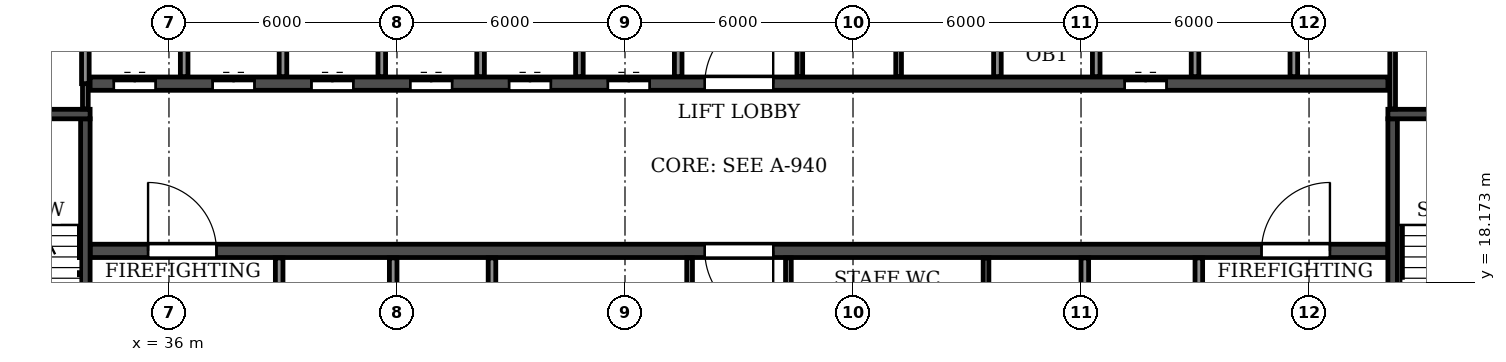
"""IFC4 building model, lengths in metres.
Left out: names, types, materials, properties, quantities, classifications, styles, units other than length and angle.
Written with IfcOpenShell. Run it as: python <this file> out.ifc"""

import sys

from ifc_helpers import new_model, si_unit, direction, frame, frame_2d, origin, place, context, subcontext, project, spatial, rectangle, extrude, element, fill, save


model = new_model("IFC4")
c1 = context("Model", 3, precision=1e-05, world=origin(), true_north=direction((0.0, 1.0)))
c2 = subcontext(c1, "Body", "Model", "MODEL_VIEW")
j1 = project(units=[si_unit("LENGTHUNIT", "METRE"), si_unit("PLANEANGLEUNIT", "RADIAN")], contexts=[c1])
p1 = place(None, origin())
s1 = spatial("IfcSite", under=j1, at=p1, CompositionType="ELEMENT")
p2 = place(p1, origin())
s2 = spatial("IfcBuilding", under=s1, at=p2, CompositionType="ELEMENT")
p3 = place(p2, frame((0.0, 0.0, 231.3)))
s3 = spatial("IfcBuildingStorey", under=s2, at=p3, CompositionType="ELEMENT", Elevation=231.3)
p4 = place(p3, frame((33.925, 19.0, 0.0), z_axis=(0.0, 0.0, 1.0), x_axis=(1.0, 0.0, 0.0)))
e1 = element("IfcWall", 1, at=p4, inside=s3, PredefinedType="SOLIDWALL", context=c2, shape_type="SweptSolid", body=[
    extrude(rectangle(XDim=34.15, YDim=0.35, at=frame_2d((17.075, 0.0))), origin(), (0.0, 0.0, 1.0), 3.08),
])
p5 = place(p4, frame((16.175, 0.0, 0.0)))
e2 = element("IfcOpeningElement", 2, at=p5, cuts=e1, PredefinedType="OPENING", context=c2, shape_type="SweptSolid", body=[
    extrude(rectangle(XDim=1.8, YDim=2.1, at=frame_2d((0.9, 1.05))), frame((0.0, 0.185, 0.0), z_axis=(0.0, -1.0, 0.0), x_axis=(1.0, 0.0, 0.0)), (0.0, 0.0, 1.0), 0.37),
])
p6 = place(p4, frame((1.525, 0.0, 0.0)))
e3 = element("IfcOpeningElement", 3, at=p6, cuts=e1, PredefinedType="OPENING", context=c2, shape_type="SweptSolid", body=[
    extrude(rectangle(XDim=1.8, YDim=2.1, at=frame_2d((0.9, 1.05))), frame((0.0, 0.185, 0.0), z_axis=(0.0, -1.0, 0.0), x_axis=(1.0, 0.0, 0.0)), (0.0, 0.0, 1.0), 0.37),
])
p7 = place(p4, frame((30.825, 0.0, 0.0)))
e4 = element("IfcOpeningElement", 4, at=p7, cuts=e1, PredefinedType="OPENING", context=c2, shape_type="SweptSolid", body=[
    extrude(rectangle(XDim=1.8, YDim=2.1, at=frame_2d((0.9, 1.05))), frame((0.0, 0.185, 0.0), z_axis=(0.0, -1.0, 0.0), x_axis=(1.0, 0.0, 0.0)), (0.0, 0.0, 1.0), 0.37),
])
p8 = place(p3, frame((33.925, 23.4, 0.0), z_axis=(0.0, 0.0, 1.0), x_axis=(1.0, 0.0, 0.0)))
e5 = element("IfcWall", 5, at=p8, inside=s3, PredefinedType="SOLIDWALL", context=c2, shape_type="SweptSolid", body=[
    extrude(rectangle(XDim=34.15, YDim=0.35, at=frame_2d((17.075, 0.0))), origin(), (0.0, 0.0, 1.0), 3.08),
])
p9 = place(p8, frame((16.175, 0.0, 0.0)))
e6 = element("IfcOpeningElement", 6, at=p9, cuts=e5, PredefinedType="OPENING", context=c2, shape_type="SweptSolid", body=[
    extrude(rectangle(XDim=1.8, YDim=2.1, at=frame_2d((0.9, 1.05))), frame((0.0, 0.185, 0.0), z_axis=(0.0, -1.0, 0.0), x_axis=(1.0, 0.0, 0.0)), (0.0, 0.0, 1.0), 0.37),
])
p10 = place(p8, frame((0.625, 0.0, 0.0)))
e7 = element("IfcOpeningElement", 7, at=p10, cuts=e5, PredefinedType="OPENING", context=c2, shape_type="SweptSolid", body=[
    extrude(rectangle(XDim=1.1, YDim=2.1, at=frame_2d((0.55, 1.05))), frame((0.0, 0.185, 0.0), z_axis=(0.0, -1.0, 0.0), x_axis=(1.0, 0.0, 0.0)), (0.0, 0.0, 1.0), 0.37),
])
p11 = place(p8, frame((3.225, 0.0, 0.0)))
e8 = element("IfcOpeningElement", 8, at=p11, cuts=e5, PredefinedType="OPENING", context=c2, shape_type="SweptSolid", body=[
    extrude(rectangle(XDim=1.1, YDim=2.1, at=frame_2d((0.55, 1.05))), frame((0.0, 0.185, 0.0), z_axis=(0.0, -1.0, 0.0), x_axis=(1.0, 0.0, 0.0)), (0.0, 0.0, 1.0), 0.37),
])
p12 = place(p8, frame((5.825, 0.0, 0.0)))
e9 = element("IfcOpeningElement", 9, at=p12, cuts=e5, PredefinedType="OPENING", context=c2, shape_type="SweptSolid", body=[
    extrude(rectangle(XDim=1.1, YDim=2.1, at=frame_2d((0.55, 1.05))), frame((0.0, 0.185, 0.0), z_axis=(0.0, -1.0, 0.0), x_axis=(1.0, 0.0, 0.0)), (0.0, 0.0, 1.0), 0.37),
])
p13 = place(p8, frame((8.425, 0.0, 0.0)))
e10 = element("IfcOpeningElement", 10, at=p13, cuts=e5, PredefinedType="OPENING", context=c2, shape_type="SweptSolid", body=[
    extrude(rectangle(XDim=1.1, YDim=2.1, at=frame_2d((0.55, 1.05))), frame((0.0, 0.185, 0.0), z_axis=(0.0, -1.0, 0.0), x_axis=(1.0, 0.0, 0.0)), (0.0, 0.0, 1.0), 0.37),
])
p14 = place(p8, frame((11.025, 0.0, 0.0)))
e11 = element("IfcOpeningElement", 11, at=p14, cuts=e5, PredefinedType="OPENING", context=c2, shape_type="SweptSolid", body=[
    extrude(rectangle(XDim=1.1, YDim=2.1, at=frame_2d((0.55, 1.05))), frame((0.0, 0.185, 0.0), z_axis=(0.0, -1.0, 0.0), x_axis=(1.0, 0.0, 0.0)), (0.0, 0.0, 1.0), 0.37),
])
p15 = place(p8, frame((13.625, 0.0, 0.0)))
e12 = element("IfcOpeningElement", 12, at=p15, cuts=e5, PredefinedType="OPENING", context=c2, shape_type="SweptSolid", body=[
    extrude(rectangle(XDim=1.1, YDim=2.1, at=frame_2d((0.55, 1.05))), frame((0.0, 0.185, 0.0), z_axis=(0.0, -1.0, 0.0), x_axis=(1.0, 0.0, 0.0)), (0.0, 0.0, 1.0), 0.37),
])
p16 = place(p8, frame((27.225, 0.0, 0.0)))
e13 = element("IfcOpeningElement", 13, at=p16, cuts=e5, PredefinedType="OPENING", context=c2, shape_type="SweptSolid", body=[
    extrude(rectangle(XDim=1.1, YDim=2.1, at=frame_2d((0.55, 1.05))), frame((0.0, 0.185, 0.0), z_axis=(0.0, -1.0, 0.0), x_axis=(1.0, 0.0, 0.0)), (0.0, 0.0, 1.0), 0.37),
])
p17 = place(p3, frame((33.8, 14.775, 0.0), z_axis=(0.0, 0.0, 1.0), x_axis=(0.0, 1.0, 0.0)))
e14 = element("IfcWall", 14, at=p17, inside=s3, PredefinedType="SOLIDWALL", context=c2, shape_type="SweptSolid", body=[
    extrude(rectangle(XDim=7.7, YDim=0.25, at=frame_2d((3.85, 0.0))), origin(), (0.0, 0.0, 1.0), 3.08),
])
p18 = place(p17, frame((0.525, 0.0, 0.0)))
e15 = element("IfcOpeningElement", 15, at=p18, cuts=e14, PredefinedType="OPENING", context=c2, shape_type="SweptSolid", body=[
    extrude(rectangle(XDim=1.0, YDim=2.1, at=frame_2d((0.5, 1.05))), frame((0.0, 0.135, 0.0), z_axis=(0.0, -1.0, 0.0), x_axis=(1.0, 0.0, 0.0)), (0.0, 0.0, 1.0), 0.27),
])
p19 = place(p3, frame((29.875, 22.6, 0.0), z_axis=(0.0, 0.0, 1.0), x_axis=(1.0, 0.0, 0.0)))
e16 = element("IfcWall", 16, at=p19, inside=s3, PredefinedType="SOLIDWALL", context=c2, shape_type="SweptSolid", body=[
    extrude(rectangle(XDim=4.05, YDim=0.25, at=frame_2d((2.025, 0.0))), origin(), (0.0, 0.0, 1.0), 3.08),
])
p20 = place(p3, frame((68.2, 14.775, 0.0), z_axis=(0.0, 0.0, 1.0), x_axis=(0.0, 1.0, 0.0)))
e17 = element("IfcWall", 17, at=p20, inside=s3, PredefinedType="SOLIDWALL", context=c2, shape_type="SweptSolid", body=[
    extrude(rectangle(XDim=7.7, YDim=0.25, at=frame_2d((3.85, 0.0))), origin(), (0.0, 0.0, 1.0), 3.08),
])
p21 = place(p20, frame((0.525, 0.0, 0.0)))
e18 = element("IfcOpeningElement", 18, at=p21, cuts=e17, PredefinedType="OPENING", context=c2, shape_type="SweptSolid", body=[
    extrude(rectangle(XDim=1.0, YDim=2.1, at=frame_2d((0.5, 1.05))), frame((0.0, 0.135, 0.0), z_axis=(0.0, -1.0, 0.0), x_axis=(1.0, 0.0, 0.0)), (0.0, 0.0, 1.0), 0.27),
])
p22 = place(p3, frame((68.075, 22.6, 0.0), z_axis=(0.0, 0.0, 1.0), x_axis=(1.0, 0.0, 0.0)))
e19 = element("IfcWall", 19, at=p22, inside=s3, PredefinedType="SOLIDWALL", context=c2, shape_type="SweptSolid", body=[
    extrude(rectangle(XDim=4.05, YDim=0.25, at=frame_2d((2.025, 0.0))), origin(), (0.0, 0.0, 1.0), 3.08),
])
for number, where, z_axis, x_axis in (
    (20, (49.7, 14.785, 0.0), (0.0, 0.0, 1.0), (0.0, 1.0, 0.0)),
    (21, (52.3, 14.785, 0.0), (0.0, 0.0, 1.0), (0.0, 1.0, 0.0)),
    (22, (52.6, 23.585, 0.0), (0.0, 0.0, 1.0), (0.0, 1.0, 0.0)),
    (23, (55.2, 23.585, 0.0), (0.0, 0.0, 1.0), (0.0, 1.0, 0.0)),
    (24, (57.5, 14.785, 0.0), (0.0, 0.0, 1.0), (0.0, 1.0, 0.0)),
):
    element("IfcWall", number, at=place(p3, frame(where, z_axis=z_axis, x_axis=x_axis)), inside=s3, PredefinedType="PARTITIONING", context=c2, shape_type="SweptSolid", body=[
        extrude(rectangle(XDim=4.03, YDim=0.15, at=frame_2d((2.015, 0.0))), origin(), (0.0, 0.0, 1.0), 3.08),
    ])
for number, where, z_axis, x_axis in (
    (25, (44.5, 14.785, 0.0), (0.0, 0.0, 1.0), (0.0, 1.0, 0.0)),
    (26, (65.6, 23.585, 0.0), (0.0, 0.0, 1.0), (0.0, 1.0, 0.0)),
):
    element("IfcWall", number, at=place(p3, frame(where, z_axis=z_axis, x_axis=x_axis)), inside=s3, PredefinedType="PARTITIONING", context=c2, shape_type="SweptSolid", body=[
        extrude(rectangle(XDim=4.03, YDim=0.2, at=frame_2d((2.015, 0.0))), origin(), (0.0, 0.0, 1.0), 3.08),
    ])
p23 = place(p3, frame((33.8, 22.735, 0.0), z_axis=(0.0, 0.0, 1.0), x_axis=(0.0, 1.0, 0.0)))
e27 = element("IfcWall", 27, at=p23, inside=s3, PredefinedType="PARTITIONING", context=c2, shape_type="SweptSolid", body=[
    extrude(rectangle(XDim=0.665, YDim=0.15, at=frame_2d((0.333, 0.0))), origin(), (0.0, 0.0, 1.0), 3.08),
])
p24 = place(p3, frame((68.2, 22.735, 0.0), z_axis=(0.0, 0.0, 1.0), x_axis=(0.0, 1.0, 0.0)))
e28 = element("IfcWall", 28, at=p24, inside=s3, PredefinedType="PARTITIONING", context=c2, shape_type="SweptSolid", body=[
    extrude(rectangle(XDim=4.88, YDim=0.15, at=frame_2d((2.44, 0.0))), origin(), (0.0, 0.0, 1.0), 3.08),
])
p25 = place(p3, frame((33.8, 23.4, 0.0), z_axis=(0.0, 0.0, 1.0), x_axis=(0.0, 1.0, 0.0)))
e29 = element("IfcWall", 29, at=p25, inside=s3, PredefinedType="PARTITIONING", context=c2, shape_type="SweptSolid", body=[
    extrude(rectangle(XDim=2.7, YDim=0.2, at=frame_2d((1.35, 0.0))), origin(), (0.0, 0.0, 1.0), 3.08),
])
p26 = place(p3, frame((36.4, 23.585, 0.0), z_axis=(0.0, 0.0, 1.0), x_axis=(0.0, 1.0, 0.0)))
e30 = element("IfcWall", 30, at=p26, inside=s3, PredefinedType="PARTITIONING", context=c2, shape_type="SweptSolid", body=[
    extrude(rectangle(XDim=2.515, YDim=0.2, at=frame_2d((1.258, 0.0))), origin(), (0.0, 0.0, 1.0), 3.08),
])
p27 = place(p3, frame((38.9, 14.785, 0.0), z_axis=(0.0, 0.0, 1.0), x_axis=(0.0, 1.0, 0.0)))
e31 = element("IfcWall", 31, at=p27, inside=s3, PredefinedType="PARTITIONING", context=c2, shape_type="SweptSolid", body=[
    extrude(rectangle(XDim=4.03, YDim=0.2, at=frame_2d((2.015, 0.0))), origin(), (0.0, 0.0, 1.0), 3.08),
])
p28 = place(p27, frame((1.465, 0.0, 0.0)))
e32 = element("IfcOpeningElement", 32, at=p28, cuts=e31, PredefinedType="OPENING", context=c2, shape_type="SweptSolid", body=[
    extrude(rectangle(XDim=1.1, YDim=2.1, at=frame_2d((0.55, 1.05))), frame((0.0, 0.11, 0.0), z_axis=(0.0, -1.0, 0.0), x_axis=(1.0, 0.0, 0.0)), (0.0, 0.0, 1.0), 0.22),
])
for number, where, z_axis, x_axis in (
    (33, (39.0, 23.585, 0.0), (0.0, 0.0, 1.0), (0.0, 1.0, 0.0)),
    (34, (41.6, 23.585, 0.0), (0.0, 0.0, 1.0), (0.0, 1.0, 0.0)),
):
    element("IfcWall", number, at=place(p3, frame(where, z_axis=z_axis, x_axis=x_axis)), inside=s3, PredefinedType="PARTITIONING", context=c2, shape_type="SweptSolid", body=[
        extrude(rectangle(XDim=2.515, YDim=0.2, at=frame_2d((1.258, 0.0))), origin(), (0.0, 0.0, 1.0), 3.08),
    ])
for number, where, z_axis, x_axis in (
    (35, (41.9, 14.785, 0.0), (0.0, 0.0, 1.0), (0.0, 1.0, 0.0)),
    (36, (44.2, 23.585, 0.0), (0.0, 0.0, 1.0), (0.0, 1.0, 0.0)),
    (37, (46.8, 23.585, 0.0), (0.0, 0.0, 1.0), (0.0, 1.0, 0.0)),
):
    element("IfcWall", number, at=place(p3, frame(where, z_axis=z_axis, x_axis=x_axis)), inside=s3, PredefinedType="PARTITIONING", context=c2, shape_type="SweptSolid", body=[
        extrude(rectangle(XDim=4.03, YDim=0.2, at=frame_2d((2.015, 0.0))), origin(), (0.0, 0.0, 1.0), 3.08),
    ])
for number, where, z_axis, x_axis in (
    (38, (49.4, 23.585, 0.0), (0.0, 0.0, 1.0), (0.0, 1.0, 0.0)),
    (39, (57.8, 23.585, 0.0), (0.0, 0.0, 1.0), (0.0, 1.0, 0.0)),
):
    element("IfcWall", number, at=place(p3, frame(where, z_axis=z_axis, x_axis=x_axis)), inside=s3, PredefinedType="PARTITIONING", context=c2, shape_type="SweptSolid", body=[
        extrude(rectangle(XDim=2.515, YDim=0.2, at=frame_2d((1.258, 0.0))), origin(), (0.0, 0.0, 1.0), 3.08),
    ])
p29 = place(p3, frame((60.1, 14.785, 0.0), z_axis=(0.0, 0.0, 1.0), x_axis=(0.0, 1.0, 0.0)))
e40 = element("IfcWall", 40, at=p29, inside=s3, PredefinedType="PARTITIONING", context=c2, shape_type="SweptSolid", body=[
    extrude(rectangle(XDim=4.03, YDim=0.2, at=frame_2d((2.015, 0.0))), origin(), (0.0, 0.0, 1.0), 3.08),
])
for number, where, z_axis, x_axis in (
    (41, (60.4, 23.585, 0.0), (0.0, 0.0, 1.0), (0.0, 1.0, 0.0)),
    (42, (63.0, 23.585, 0.0), (0.0, 0.0, 1.0), (0.0, 1.0, 0.0)),
):
    element("IfcWall", number, at=place(p3, frame(where, z_axis=z_axis, x_axis=x_axis)), inside=s3, PredefinedType="PARTITIONING", context=c2, shape_type="SweptSolid", body=[
        extrude(rectangle(XDim=2.515, YDim=0.2, at=frame_2d((1.258, 0.0))), origin(), (0.0, 0.0, 1.0), 3.08),
    ])
p30 = place(p3, frame((63.1, 14.785, 0.0), z_axis=(0.0, 0.0, 1.0), x_axis=(0.0, 1.0, 0.0)))
e43 = element("IfcWall", 43, at=p30, inside=s3, PredefinedType="PARTITIONING", context=c2, shape_type="SweptSolid", body=[
    extrude(rectangle(XDim=4.03, YDim=0.2, at=frame_2d((2.015, 0.0))), origin(), (0.0, 0.0, 1.0), 3.08),
])
p31 = place(p30, frame((1.465, 0.0, 0.0)))
e44 = element("IfcOpeningElement", 44, at=p31, cuts=e43, PredefinedType="OPENING", context=c2, shape_type="SweptSolid", body=[
    extrude(rectangle(XDim=1.1, YDim=2.1, at=frame_2d((0.55, 1.05))), frame((0.0, 0.11, 0.0), z_axis=(0.0, -1.0, 0.0), x_axis=(1.0, 0.0, 0.0)), (0.0, 0.0, 1.0), 0.22),
])
p32 = place(p9, origin())
e45 = element("IfcDoor", 45, at=p32, inside=s3, OperationType="DOUBLE_DOOR_SINGLE_SWING", PredefinedType="DOOR", context=c2, shape_type="SweptSolid", body=[
    extrude(rectangle(XDim=1.8, YDim=2.1, at=frame_2d((0.9, 1.05))), frame((0.0, 0.025, 0.0), z_axis=(0.0, -1.0, 0.0), x_axis=(1.0, 0.0, 0.0)), (0.0, 0.0, 1.0), 0.05),
])
fill(e6, e45)
p33 = place(p5, frame((1.8, 0.0, 0.0), z_axis=(0.0, 0.0, 1.0), x_axis=(-1.0, 0.0, 0.0)))
e46 = element("IfcDoor", 46, at=p33, inside=s3, OperationType="DOUBLE_DOOR_SINGLE_SWING", PredefinedType="DOOR", context=c2, shape_type="SweptSolid", body=[
    extrude(rectangle(XDim=1.8, YDim=2.1, at=frame_2d((0.9, 1.05))), frame((0.0, 0.025, 0.0), z_axis=(0.0, -1.0, 0.0), x_axis=(1.0, 0.0, 0.0)), (0.0, 0.0, 1.0), 0.05),
])
fill(e2, e46)
p34 = place(p10, origin())
e47 = element("IfcDoor", 47, at=p34, inside=s3, OperationType="DOUBLE_DOOR_SLIDING", PredefinedType="DOOR", context=c2, shape_type="SweptSolid", body=[
    extrude(rectangle(XDim=1.1, YDim=2.1, at=frame_2d((0.55, 1.05))), frame((0.0, 0.025, 0.0), z_axis=(0.0, -1.0, 0.0), x_axis=(1.0, 0.0, 0.0)), (0.0, 0.0, 1.0), 0.05),
])
fill(e7, e47)
p35 = place(p6, origin())
e48 = element("IfcDoor", 48, at=p35, inside=s3, OperationType="DOUBLE_DOOR_SINGLE_SWING", PredefinedType="DOOR", context=c2, shape_type="SweptSolid", body=[
    extrude(rectangle(XDim=1.8, YDim=2.1, at=frame_2d((0.9, 1.05))), frame((0.0, 0.025, 0.0), z_axis=(0.0, -1.0, 0.0), x_axis=(1.0, 0.0, 0.0)), (0.0, 0.0, 1.0), 0.05),
])
fill(e3, e48)
p36 = place(p11, origin())
e49 = element("IfcDoor", 49, at=p36, inside=s3, OperationType="DOUBLE_DOOR_SLIDING", PredefinedType="DOOR", context=c2, shape_type="SweptSolid", body=[
    extrude(rectangle(XDim=1.1, YDim=2.1, at=frame_2d((0.55, 1.05))), frame((0.0, 0.025, 0.0), z_axis=(0.0, -1.0, 0.0), x_axis=(1.0, 0.0, 0.0)), (0.0, 0.0, 1.0), 0.05),
])
fill(e8, e49)
p37 = place(p12, origin())
e50 = element("IfcDoor", 50, at=p37, inside=s3, OperationType="DOUBLE_DOOR_SLIDING", PredefinedType="DOOR", context=c2, shape_type="SweptSolid", body=[
    extrude(rectangle(XDim=1.1, YDim=2.1, at=frame_2d((0.55, 1.05))), frame((0.0, 0.025, 0.0), z_axis=(0.0, -1.0, 0.0), x_axis=(1.0, 0.0, 0.0)), (0.0, 0.0, 1.0), 0.05),
])
fill(e9, e50)
p38 = place(p13, origin())
e51 = element("IfcDoor", 51, at=p38, inside=s3, OperationType="DOUBLE_DOOR_SLIDING", PredefinedType="DOOR", context=c2, shape_type="SweptSolid", body=[
    extrude(rectangle(XDim=1.1, YDim=2.1, at=frame_2d((0.55, 1.05))), frame((0.0, 0.025, 0.0), z_axis=(0.0, -1.0, 0.0), x_axis=(1.0, 0.0, 0.0)), (0.0, 0.0, 1.0), 0.05),
])
fill(e10, e51)
p39 = place(p14, origin())
e52 = element("IfcDoor", 52, at=p39, inside=s3, OperationType="DOUBLE_DOOR_SLIDING", PredefinedType="DOOR", context=c2, shape_type="SweptSolid", body=[
    extrude(rectangle(XDim=1.1, YDim=2.1, at=frame_2d((0.55, 1.05))), frame((0.0, 0.025, 0.0), z_axis=(0.0, -1.0, 0.0), x_axis=(1.0, 0.0, 0.0)), (0.0, 0.0, 1.0), 0.05),
])
fill(e11, e52)
p40 = place(p15, origin())
e53 = element("IfcDoor", 53, at=p40, inside=s3, OperationType="DOUBLE_DOOR_SLIDING", PredefinedType="DOOR", context=c2, shape_type="SweptSolid", body=[
    extrude(rectangle(XDim=1.1, YDim=2.1, at=frame_2d((0.55, 1.05))), frame((0.0, 0.025, 0.0), z_axis=(0.0, -1.0, 0.0), x_axis=(1.0, 0.0, 0.0)), (0.0, 0.0, 1.0), 0.05),
])
fill(e12, e53)
p41 = place(p16, origin())
e54 = element("IfcDoor", 54, at=p41, inside=s3, OperationType="DOUBLE_DOOR_SLIDING", PredefinedType="DOOR", context=c2, shape_type="SweptSolid", body=[
    extrude(rectangle(XDim=1.1, YDim=2.1, at=frame_2d((0.55, 1.05))), frame((0.0, 0.025, 0.0), z_axis=(0.0, -1.0, 0.0), x_axis=(1.0, 0.0, 0.0)), (0.0, 0.0, 1.0), 0.05),
])
fill(e13, e54)
p42 = place(p7, origin())
e55 = element("IfcDoor", 55, at=p42, inside=s3, OperationType="DOUBLE_DOOR_SINGLE_SWING", PredefinedType="DOOR", context=c2, shape_type="SweptSolid", body=[
    extrude(rectangle(XDim=1.8, YDim=2.1, at=frame_2d((0.9, 1.05))), frame((0.0, 0.025, 0.0), z_axis=(0.0, -1.0, 0.0), x_axis=(1.0, 0.0, 0.0)), (0.0, 0.0, 1.0), 0.05),
])
fill(e4, e55)
save(model, sys.argv[1])
